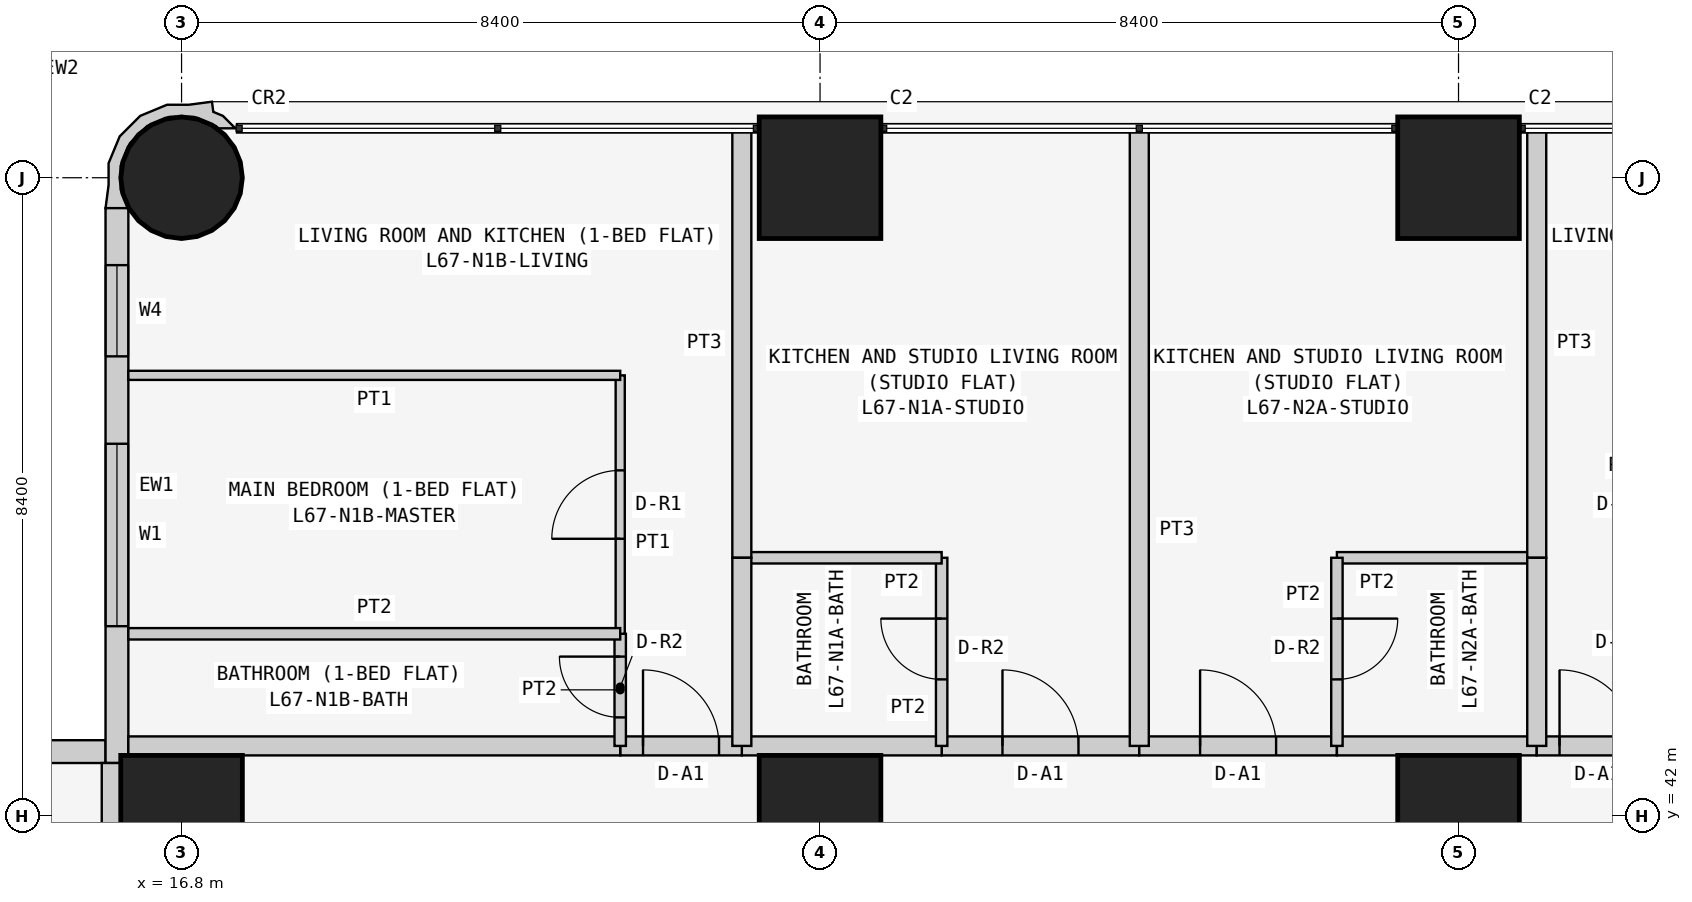
"""IFC4 building model, lengths in metres.
Left out: names, types, materials, properties, quantities, classifications, styles, units other than length and angle.
Written with IfcOpenShell. Run it as: python <this file> out.ifc"""

import sys

from ifc_helpers import new_model, si_unit, direction, frame, frame_2d, origin, origin_2d, place, context, subcontext, project, spatial, polyline, rectangle, circle, outline, extrude, element, fill, save


model = new_model("IFC4")
c1 = context("Model", 3, precision=1e-05, world=origin(), true_north=direction((0.0, 1.0)))
c2 = subcontext(c1, "Body", "Model", "MODEL_VIEW")
j1 = project(units=[si_unit("LENGTHUNIT", "METRE"), si_unit("PLANEANGLEUNIT", "RADIAN")], contexts=[c1])
p1 = place(None, origin())
s1 = spatial("IfcSite", under=j1, at=p1, CompositionType="ELEMENT")
p2 = place(p1, origin())
s2 = spatial("IfcBuilding", under=s1, at=p2, CompositionType="ELEMENT")
p3 = place(p2, frame((0.0, 0.0, 257.7)))
s3 = spatial("IfcBuildingStorey", under=s2, at=p3, CompositionType="ELEMENT", Elevation=257.7)
p4 = place(p3, frame((16.8, 42.0, 0.0), z_axis=(0.0, 0.0, 1.0), x_axis=(1.0, 0.0, 0.0)))
e1 = element("IfcColumn", 1, at=p4, inside=s3, PredefinedType="COLUMN", context=c2, shape_type="SweptSolid", body=[
    extrude(rectangle(XDim=1.6, YDim=1.6, at=origin_2d()), origin(), (0.0, 0.0, 1.0), 3.6),
])
p5 = place(p3, frame((16.8, 50.4, 0.0), z_axis=(0.0, 0.0, 1.0), x_axis=(1.0, 0.0, 0.0)))
e2 = element("IfcColumn", 2, at=p5, inside=s3, PredefinedType="COLUMN", context=c2, shape_type="SweptSolid", body=[
    extrude(circle(Radius=0.8, at=origin_2d()), origin(), (0.0, 0.0, 1.0), 3.6),
])
for number, where, z_axis, x_axis in (
    (3, (25.2, 42.0, 0.0), (0.0, 0.0, 1.0), (1.0, 0.0, 0.0)),
    (4, (25.2, 50.4, 0.0), (0.0, 0.0, 1.0), (1.0, 0.0, 0.0)),
    (5, (33.6, 42.0, 0.0), (0.0, 0.0, 1.0), (1.0, 0.0, 0.0)),
    (6, (33.6, 50.4, 0.0), (0.0, 0.0, 1.0), (1.0, 0.0, 0.0)),
):
    element("IfcColumn", number, at=place(p3, frame(where, z_axis=z_axis, x_axis=x_axis)), inside=s3, PredefinedType="COLUMN", context=c2, shape_type="SweptSolid", body=[
        extrude(rectangle(XDim=1.6, YDim=1.6, at=origin_2d()), origin(), (0.0, 0.0, 1.0), 3.6),
    ])
p6 = place(p3, frame((15.8, 42.85, 0.0), z_axis=(0.0, 0.0, 1.0), x_axis=(-1.0, 0.0, 0.0)))
e7 = element("IfcWall", 7, at=p6, inside=s3, PredefinedType="SOLIDWALL", context=c2, shape_type="SweptSolid", body=[
    extrude(rectangle(XDim=7.0, YDim=0.3, at=frame_2d((3.5, 0.0))), origin(), (0.0, 0.0, 1.0), 3.45),
])
p7 = place(p6, frame((1.5, 0.0, 0.9)))
e8 = element("IfcOpeningElement", 8, at=p7, cuts=e7, PredefinedType="OPENING", context=c2, shape_type="SweptSolid", body=[
    extrude(rectangle(XDim=2.4, YDim=1.5, at=frame_2d((1.2, 0.75))), frame((0.0, 0.16, 0.0), z_axis=(0.0, -1.0, 0.0), x_axis=(1.0, 0.0, 0.0)), (0.0, 0.0, 1.0), 0.32),
])
p8 = place(p6, frame((5.05, 0.0, 0.9)))
e9 = element("IfcOpeningElement", 9, at=p8, cuts=e7, PredefinedType="OPENING", context=c2, shape_type="SweptSolid", body=[
    extrude(rectangle(XDim=1.2, YDim=1.5, at=frame_2d((0.6, 0.75))), frame((0.0, 0.16, 0.0), z_axis=(0.0, -1.0, 0.0), x_axis=(1.0, 0.0, 0.0)), (0.0, 0.0, 1.0), 0.32),
])
p9 = place(p3, frame((15.95, 50.0, 0.0), z_axis=(0.0, 0.0, 1.0), x_axis=(0.0, -1.0, 0.0)))
e10 = element("IfcWall", 10, at=p9, inside=s3, PredefinedType="SOLIDWALL", context=c2, shape_type="SweptSolid", body=[
    extrude(rectangle(XDim=7.3, YDim=0.3, at=frame_2d((3.65, 0.0))), origin(), (0.0, 0.0, 1.0), 3.45),
])
p10 = place(p9, frame((3.1, 0.0, 0.9)))
e11 = element("IfcOpeningElement", 11, at=p10, cuts=e10, PredefinedType="OPENING", context=c2, shape_type="SweptSolid", body=[
    extrude(rectangle(XDim=2.4, YDim=1.5, at=frame_2d((1.2, 0.75))), frame((0.0, 0.16, 0.0), z_axis=(0.0, -1.0, 0.0), x_axis=(1.0, 0.0, 0.0)), (0.0, 0.0, 1.0), 0.32),
])
p11 = place(p9, frame((0.75, 0.0, 0.9)))
e12 = element("IfcOpeningElement", 12, at=p11, cuts=e10, PredefinedType="OPENING", context=c2, shape_type="SweptSolid", body=[
    extrude(rectangle(XDim=1.2, YDim=1.5, at=frame_2d((0.6, 0.75))), frame((0.0, 0.16, 0.0), z_axis=(0.0, -1.0, 0.0), x_axis=(1.0, 0.0, 0.0)), (0.0, 0.0, 1.0), 0.32),
])
p12 = place(p3, frame((17.448, 50.995, 0.0), z_axis=(0.0, 0.0, 1.0), x_axis=(-0.343276641956, 0.93923434088, 0.0)))
e13 = element("IfcWall", 13, at=p12, inside=s3, PredefinedType="SOLIDWALL", context=c2, shape_type="SweptSolid", body=[
    extrude(outline(polyline([(0.241, 0.023), (0.333, 0.124), (0.465, 0.094), (0.532, 0.393), (0.631, 0.663), (0.614, 1.045), (0.454, 1.391), (0.172, 1.649), (-0.098, 1.748), (-0.369, 1.89), (-0.509, 1.621), (-0.491, 1.615), (-0.479, 1.609), (-0.211, 1.62), (0.088, 1.511), (0.323, 1.295), (0.457, 1.006), (0.47, 0.688), (0.361, 0.389), (0.145, 0.154), (0.108, 0.137), (0.031, -0.075), (0.241, 0.023)])), origin(), (0.0, 0.0, 1.0), 3.45),
])
p13 = place(p3, frame((26.8, 42.925, 0.0), z_axis=(0.0, 0.0, 1.0), x_axis=(1.0, 0.0, 0.0)))
e14 = element("IfcWall", 14, at=p13, inside=s3, PredefinedType="PARTITIONING", context=c2, shape_type="SweptSolid", body=[
    extrude(rectangle(XDim=2.6, YDim=0.25, at=frame_2d((1.3, 0.0))), origin(), (0.0, 0.0, 1.0), 3.45),
])
p14 = place(p13, frame((0.8, 0.0, 0.0)))
e15 = element("IfcOpeningElement", 15, at=p14, cuts=e14, PredefinedType="OPENING", context=c2, shape_type="SweptSolid", body=[
    extrude(rectangle(XDim=1.0, YDim=2.1, at=frame_2d((0.5, 1.05))), frame((0.0, 0.135, 0.0), z_axis=(0.0, -1.0, 0.0), x_axis=(1.0, 0.0, 0.0)), (0.0, 0.0, 1.0), 0.27),
])
p15 = place(p3, frame((24.171, 42.925, 0.0), z_axis=(0.0, 0.0, 1.0), x_axis=(1.0, 0.0, 0.0)))
e16 = element("IfcWall", 16, at=p15, inside=s3, PredefinedType="PARTITIONING", context=c2, shape_type="SweptSolid", body=[
    extrude(rectangle(XDim=2.629, YDim=0.25, at=frame_2d((1.314, 0.0))), origin(), (0.0, 0.0, 1.0), 3.45),
])
p16 = place(p3, frame((22.571, 42.925, 0.0), z_axis=(0.0, 0.0, 1.0), x_axis=(1.0, 0.0, 0.0)))
e17 = element("IfcWall", 17, at=p16, inside=s3, PredefinedType="PARTITIONING", context=c2, shape_type="SweptSolid", body=[
    extrude(rectangle(XDim=1.6, YDim=0.25, at=frame_2d((0.8, 0.0))), origin(), (0.0, 0.0, 1.0), 3.45),
])
p17 = place(p16, frame((0.3, 0.0, 0.0)))
e18 = element("IfcOpeningElement", 18, at=p17, cuts=e17, PredefinedType="OPENING", context=c2, shape_type="SweptSolid", body=[
    extrude(rectangle(XDim=1.0, YDim=2.1, at=frame_2d((0.5, 1.05))), frame((0.0, 0.135, 0.0), z_axis=(0.0, -1.0, 0.0), x_axis=(1.0, 0.0, 0.0)), (0.0, 0.0, 1.0), 0.27),
])
p18 = place(p3, frame((16.1, 42.925, 0.0), z_axis=(0.0, 0.0, 1.0), x_axis=(1.0, 0.0, 0.0)))
e19 = element("IfcWall", 19, at=p18, inside=s3, PredefinedType="PARTITIONING", context=c2, shape_type="SweptSolid", body=[
    extrude(rectangle(XDim=6.471, YDim=0.25, at=frame_2d((3.235, 0.0))), origin(), (0.0, 0.0, 1.0), 3.45),
])
p19 = place(p3, frame((29.4, 42.925, 0.0), z_axis=(0.0, 0.0, 1.0), x_axis=(1.0, 0.0, 0.0)))
e20 = element("IfcWall", 20, at=p19, inside=s3, PredefinedType="PARTITIONING", context=c2, shape_type="SweptSolid", body=[
    extrude(rectangle(XDim=2.6, YDim=0.25, at=frame_2d((1.3, 0.0))), origin(), (0.0, 0.0, 1.0), 3.45),
])
p20 = place(p19, frame((0.8, 0.0, 0.0)))
e21 = element("IfcOpeningElement", 21, at=p20, cuts=e20, PredefinedType="OPENING", context=c2, shape_type="SweptSolid", body=[
    extrude(rectangle(XDim=1.0, YDim=2.1, at=frame_2d((0.5, 1.05))), frame((0.0, 0.135, 0.0), z_axis=(0.0, -1.0, 0.0), x_axis=(1.0, 0.0, 0.0)), (0.0, 0.0, 1.0), 0.27),
])
p21 = place(p3, frame((32.0, 42.925, 0.0), z_axis=(0.0, 0.0, 1.0), x_axis=(1.0, 0.0, 0.0)))
e22 = element("IfcWall", 22, at=p21, inside=s3, PredefinedType="PARTITIONING", context=c2, shape_type="SweptSolid", body=[
    extrude(rectangle(XDim=2.629, YDim=0.25, at=frame_2d((1.314, 0.0))), origin(), (0.0, 0.0, 1.0), 3.45),
])
p22 = place(p3, frame((34.629, 42.925, 0.0), z_axis=(0.0, 0.0, 1.0), x_axis=(1.0, 0.0, 0.0)))
e23 = element("IfcWall", 23, at=p22, inside=s3, PredefinedType="PARTITIONING", context=c2, shape_type="SweptSolid", body=[
    extrude(rectangle(XDim=1.6, YDim=0.25, at=frame_2d((0.8, 0.0))), origin(), (0.0, 0.0, 1.0), 3.45),
])
p23 = place(p22, frame((0.3, 0.0, 0.0)))
e24 = element("IfcOpeningElement", 24, at=p23, cuts=e23, PredefinedType="OPENING", context=c2, shape_type="SweptSolid", body=[
    extrude(rectangle(XDim=1.0, YDim=2.1, at=frame_2d((0.5, 1.05))), frame((0.0, 0.135, 0.0), z_axis=(0.0, -1.0, 0.0), x_axis=(1.0, 0.0, 0.0)), (0.0, 0.0, 1.0), 0.27),
])
p24 = place(p3, frame((15.875, 35.829, 0.0), z_axis=(0.0, 0.0, 1.0), x_axis=(0.0, 1.0, 0.0)))
e25 = element("IfcWall", 25, at=p24, inside=s3, PredefinedType="PARTITIONING", context=c2, shape_type="SweptSolid", body=[
    extrude(rectangle(XDim=6.871, YDim=0.25, at=frame_2d((3.436, 0.0))), origin(), (0.0, 0.0, 1.0), 3.45),
])
p25 = place(p3, frame((26.8, 42.925, 0.0), z_axis=(0.0, 0.0, 1.0), x_axis=(0.0, 1.0, 0.0)))
e26 = element("IfcWall", 26, at=p25, inside=s3, PredefinedType="PARTITIONING", context=c2, shape_type="SweptSolid", body=[
    extrude(rectangle(XDim=2.475, YDim=0.15, at=frame_2d((1.237, 0.0))), origin(), (0.0, 0.0, 1.0), 3.45),
])
p26 = place(p25, frame((0.875, 0.0, 0.0)))
e27 = element("IfcOpeningElement", 27, at=p26, cuts=e26, PredefinedType="OPENING", context=c2, shape_type="SweptSolid", body=[
    extrude(rectangle(XDim=0.8, YDim=2.1, at=frame_2d((0.4, 1.05))), frame((0.0, 0.085, 0.0), z_axis=(0.0, -1.0, 0.0), x_axis=(1.0, 0.0, 0.0)), (0.0, 0.0, 1.0), 0.17),
])
p27 = place(p3, frame((26.8, 45.4, 0.0), z_axis=(0.0, 0.0, 1.0), x_axis=(-1.0, 0.0, 0.0)))
e28 = element("IfcWall", 28, at=p27, inside=s3, PredefinedType="PARTITIONING", context=c2, shape_type="SweptSolid", body=[
    extrude(rectangle(XDim=2.629, YDim=0.15, at=frame_2d((1.314, 0.0))), origin(), (0.0, 0.0, 1.0), 3.45),
])
p28 = place(p3, frame((24.171, 45.4, 0.0), z_axis=(0.0, 0.0, 1.0), x_axis=(0.0, 1.0, 0.0)))
e29 = element("IfcWall", 29, at=p28, inside=s3, PredefinedType="PARTITIONING", context=c2, shape_type="SweptSolid", body=[
    extrude(rectangle(XDim=5.65, YDim=0.25, at=frame_2d((2.825, 0.0))), origin(), (0.0, 0.0, 1.0), 3.45),
])
p29 = place(p3, frame((29.4, 51.05, 0.0), z_axis=(0.0, 0.0, 1.0), x_axis=(0.0, -1.0, 0.0)))
e30 = element("IfcWall", 30, at=p29, inside=s3, PredefinedType="PARTITIONING", context=c2, shape_type="SweptSolid", body=[
    extrude(rectangle(XDim=8.125, YDim=0.25, at=frame_2d((4.062, 0.0))), origin(), (0.0, 0.0, 1.0), 2.848),
])
p30 = place(p3, frame((24.171, 45.4, 0.0), z_axis=(0.0, 0.0, 1.0), x_axis=(0.0, -1.0, 0.0)))
e31 = element("IfcWall", 31, at=p30, inside=s3, PredefinedType="PARTITIONING", context=c2, shape_type="SweptSolid", body=[
    extrude(rectangle(XDim=2.475, YDim=0.25, at=frame_2d((1.237, 0.0))), origin(), (0.0, 0.0, 1.0), 3.45),
])
p31 = place(p3, frame((22.571, 42.925, 0.0), z_axis=(0.0, 0.0, 1.0), x_axis=(0.0, 1.0, 0.0)))
e32 = element("IfcWall", 32, at=p31, inside=s3, PredefinedType="PARTITIONING", context=c2, shape_type="SweptSolid", body=[
    extrude(rectangle(XDim=1.475, YDim=0.15, at=frame_2d((0.737, 0.0))), origin(), (0.0, 0.0, 1.0), 3.45),
])
p32 = place(p31, frame((0.375, 0.0, 0.0)))
e33 = element("IfcOpeningElement", 33, at=p32, cuts=e32, PredefinedType="OPENING", context=c2, shape_type="SweptSolid", body=[
    extrude(rectangle(XDim=0.8, YDim=2.1, at=frame_2d((0.4, 1.05))), frame((0.0, 0.085, 0.0), z_axis=(0.0, -1.0, 0.0), x_axis=(1.0, 0.0, 0.0)), (0.0, 0.0, 1.0), 0.17),
])
p33 = place(p3, frame((22.571, 44.4, 0.0), z_axis=(0.0, 0.0, 1.0), x_axis=(0.0, 1.0, 0.0)))
e34 = element("IfcWall", 34, at=p33, inside=s3, PredefinedType="PARTITIONING", context=c2, shape_type="SweptSolid", body=[
    extrude(rectangle(XDim=3.4, YDim=0.12, at=frame_2d((1.7, 0.0))), origin(), (0.0, 0.0, 1.0), 3.45),
])
p34 = place(p33, frame((1.25, 0.0, 0.0)))
e35 = element("IfcOpeningElement", 35, at=p34, cuts=e34, PredefinedType="OPENING", context=c2, shape_type="SweptSolid", body=[
    extrude(rectangle(XDim=0.9, YDim=2.1, at=frame_2d((0.45, 1.05))), frame((0.0, 0.07, 0.0), z_axis=(0.0, -1.0, 0.0), x_axis=(1.0, 0.0, 0.0)), (0.0, 0.0, 1.0), 0.14),
])
p35 = place(p3, frame((22.571, 47.8, 0.0), z_axis=(0.0, 0.0, 1.0), x_axis=(-1.0, 0.0, 0.0)))
e36 = element("IfcWall", 36, at=p35, inside=s3, PredefinedType="PARTITIONING", context=c2, shape_type="SweptSolid", body=[
    extrude(rectangle(XDim=6.471, YDim=0.12, at=frame_2d((3.235, 0.0))), origin(), (0.0, 0.0, 1.0), 3.45),
])
p36 = place(p3, frame((22.571, 44.4, 0.0), z_axis=(0.0, 0.0, 1.0), x_axis=(-1.0, 0.0, 0.0)))
e37 = element("IfcWall", 37, at=p36, inside=s3, PredefinedType="PARTITIONING", context=c2, shape_type="SweptSolid", body=[
    extrude(rectangle(XDim=6.471, YDim=0.15, at=frame_2d((3.235, 0.0))), origin(), (0.0, 0.0, 1.0), 3.45),
])
p37 = place(p3, frame((34.629, 45.4, 0.0), z_axis=(0.0, 0.0, 1.0), x_axis=(-1.0, 0.0, 0.0)))
e38 = element("IfcWall", 38, at=p37, inside=s3, PredefinedType="PARTITIONING", context=c2, shape_type="SweptSolid", body=[
    extrude(rectangle(XDim=2.629, YDim=0.15, at=frame_2d((1.314, 0.0))), origin(), (0.0, 0.0, 1.0), 3.45),
])
p38 = place(p3, frame((32.0, 45.4, 0.0), z_axis=(0.0, 0.0, 1.0), x_axis=(0.0, -1.0, 0.0)))
e39 = element("IfcWall", 39, at=p38, inside=s3, PredefinedType="PARTITIONING", context=c2, shape_type="SweptSolid", body=[
    extrude(rectangle(XDim=2.475, YDim=0.15, at=frame_2d((1.237, 0.0))), origin(), (0.0, 0.0, 1.0), 3.45),
])
p39 = place(p38, frame((0.8, 0.0, 0.0)))
e40 = element("IfcOpeningElement", 40, at=p39, cuts=e39, PredefinedType="OPENING", context=c2, shape_type="SweptSolid", body=[
    extrude(rectangle(XDim=0.8, YDim=2.1, at=frame_2d((0.4, 1.05))), frame((0.0, 0.085, 0.0), z_axis=(0.0, -1.0, 0.0), x_axis=(1.0, 0.0, 0.0)), (0.0, 0.0, 1.0), 0.17),
])
p40 = place(p3, frame((34.629, 51.05, 0.0), z_axis=(0.0, 0.0, 1.0), x_axis=(0.0, -1.0, 0.0)))
e41 = element("IfcWall", 41, at=p40, inside=s3, PredefinedType="PARTITIONING", context=c2, shape_type="SweptSolid", body=[
    extrude(rectangle(XDim=5.65, YDim=0.25, at=frame_2d((2.825, 0.0))), origin(), (0.0, 0.0, 1.0), 3.45),
])
p41 = place(p3, frame((34.629, 45.4, 0.0), z_axis=(0.0, 0.0, 1.0), x_axis=(0.0, -1.0, 0.0)))
e42 = element("IfcWall", 42, at=p41, inside=s3, PredefinedType="PARTITIONING", context=c2, shape_type="SweptSolid", body=[
    extrude(rectangle(XDim=2.475, YDim=0.25, at=frame_2d((1.237, 0.0))), origin(), (0.0, 0.0, 1.0), 3.45),
])
p42 = place(p10, origin())
e43 = element("IfcWindow", 43, at=p42, inside=s3, PartitioningType="SINGLE_PANEL", PredefinedType="WINDOW", context=c2, shape_type="SweptSolid", body=[
    extrude(rectangle(XDim=2.4, YDim=1.5, at=frame_2d((1.2, 0.75))), frame((0.0, 0.03, 0.0), z_axis=(0.0, -1.0, 0.0), x_axis=(1.0, 0.0, 0.0)), (0.0, 0.0, 1.0), 0.06),
])
fill(e11, e43)
p43 = place(p11, origin())
e44 = element("IfcWindow", 44, at=p43, inside=s3, PartitioningType="SINGLE_PANEL", PredefinedType="WINDOW", context=c2, shape_type="SweptSolid", body=[
    extrude(rectangle(XDim=1.2, YDim=1.5, at=frame_2d((0.6, 0.75))), frame((0.0, 0.03, 0.0), z_axis=(0.0, -1.0, 0.0), x_axis=(1.0, 0.0, 0.0)), (0.0, 0.0, 1.0), 0.06),
])
fill(e12, e44)
p44 = place(p14, origin())
e45 = element("IfcDoor", 45, at=p44, inside=s3, OperationType="SINGLE_SWING_LEFT", PredefinedType="DOOR", context=c2, shape_type="SweptSolid", body=[
    extrude(rectangle(XDim=1.0, YDim=2.1, at=frame_2d((0.5, 1.05))), frame((0.0, 0.025, 0.0), z_axis=(0.0, -1.0, 0.0), x_axis=(1.0, 0.0, 0.0)), (0.0, 0.0, 1.0), 0.05),
])
fill(e15, e45)
p45 = place(p26, origin())
e46 = element("IfcDoor", 46, at=p45, inside=s3, OperationType="SINGLE_SWING_RIGHT", PredefinedType="DOOR", context=c2, shape_type="SweptSolid", body=[
    extrude(rectangle(XDim=0.8, YDim=2.1, at=frame_2d((0.4, 1.05))), frame((0.0, 0.025, 0.0), z_axis=(0.0, -1.0, 0.0), x_axis=(1.0, 0.0, 0.0)), (0.0, 0.0, 1.0), 0.05),
])
fill(e27, e46)
p46 = place(p17, origin())
e47 = element("IfcDoor", 47, at=p46, inside=s3, OperationType="SINGLE_SWING_LEFT", PredefinedType="DOOR", context=c2, shape_type="SweptSolid", body=[
    extrude(rectangle(XDim=1.0, YDim=2.1, at=frame_2d((0.5, 1.05))), frame((0.0, 0.025, 0.0), z_axis=(0.0, -1.0, 0.0), x_axis=(1.0, 0.0, 0.0)), (0.0, 0.0, 1.0), 0.05),
])
fill(e18, e47)
p47 = place(p32, origin())
e48 = element("IfcDoor", 48, at=p47, inside=s3, OperationType="SINGLE_SWING_RIGHT", PredefinedType="DOOR", context=c2, shape_type="SweptSolid", body=[
    extrude(rectangle(XDim=0.8, YDim=2.1, at=frame_2d((0.4, 1.05))), frame((0.0, 0.025, 0.0), z_axis=(0.0, -1.0, 0.0), x_axis=(1.0, 0.0, 0.0)), (0.0, 0.0, 1.0), 0.05),
])
fill(e33, e48)
p48 = place(p34, origin())
e49 = element("IfcDoor", 49, at=p48, inside=s3, OperationType="SINGLE_SWING_LEFT", PredefinedType="DOOR", context=c2, shape_type="SweptSolid", body=[
    extrude(rectangle(XDim=0.9, YDim=2.1, at=frame_2d((0.45, 1.05))), frame((0.0, 0.025, 0.0), z_axis=(0.0, -1.0, 0.0), x_axis=(1.0, 0.0, 0.0)), (0.0, 0.0, 1.0), 0.05),
])
fill(e35, e49)
p49 = place(p20, origin())
e50 = element("IfcDoor", 50, at=p49, inside=s3, OperationType="SINGLE_SWING_LEFT", PredefinedType="DOOR", context=c2, shape_type="SweptSolid", body=[
    extrude(rectangle(XDim=1.0, YDim=2.1, at=frame_2d((0.5, 1.05))), frame((0.0, 0.025, 0.0), z_axis=(0.0, -1.0, 0.0), x_axis=(1.0, 0.0, 0.0)), (0.0, 0.0, 1.0), 0.05),
])
fill(e21, e50)
p50 = place(p39, origin())
e51 = element("IfcDoor", 51, at=p50, inside=s3, OperationType="SINGLE_SWING_LEFT", PredefinedType="DOOR", context=c2, shape_type="SweptSolid", body=[
    extrude(rectangle(XDim=0.8, YDim=2.1, at=frame_2d((0.4, 1.05))), frame((0.0, 0.025, 0.0), z_axis=(0.0, -1.0, 0.0), x_axis=(1.0, 0.0, 0.0)), (0.0, 0.0, 1.0), 0.05),
])
fill(e40, e51)
p51 = place(p23, origin())
e52 = element("IfcDoor", 52, at=p51, inside=s3, OperationType="SINGLE_SWING_LEFT", PredefinedType="DOOR", context=c2, shape_type="SweptSolid", body=[
    extrude(rectangle(XDim=1.0, YDim=2.1, at=frame_2d((0.5, 1.05))), frame((0.0, 0.025, 0.0), z_axis=(0.0, -1.0, 0.0), x_axis=(1.0, 0.0, 0.0)), (0.0, 0.0, 1.0), 0.05),
])
fill(e24, e52)
save(model, sys.argv[1])
